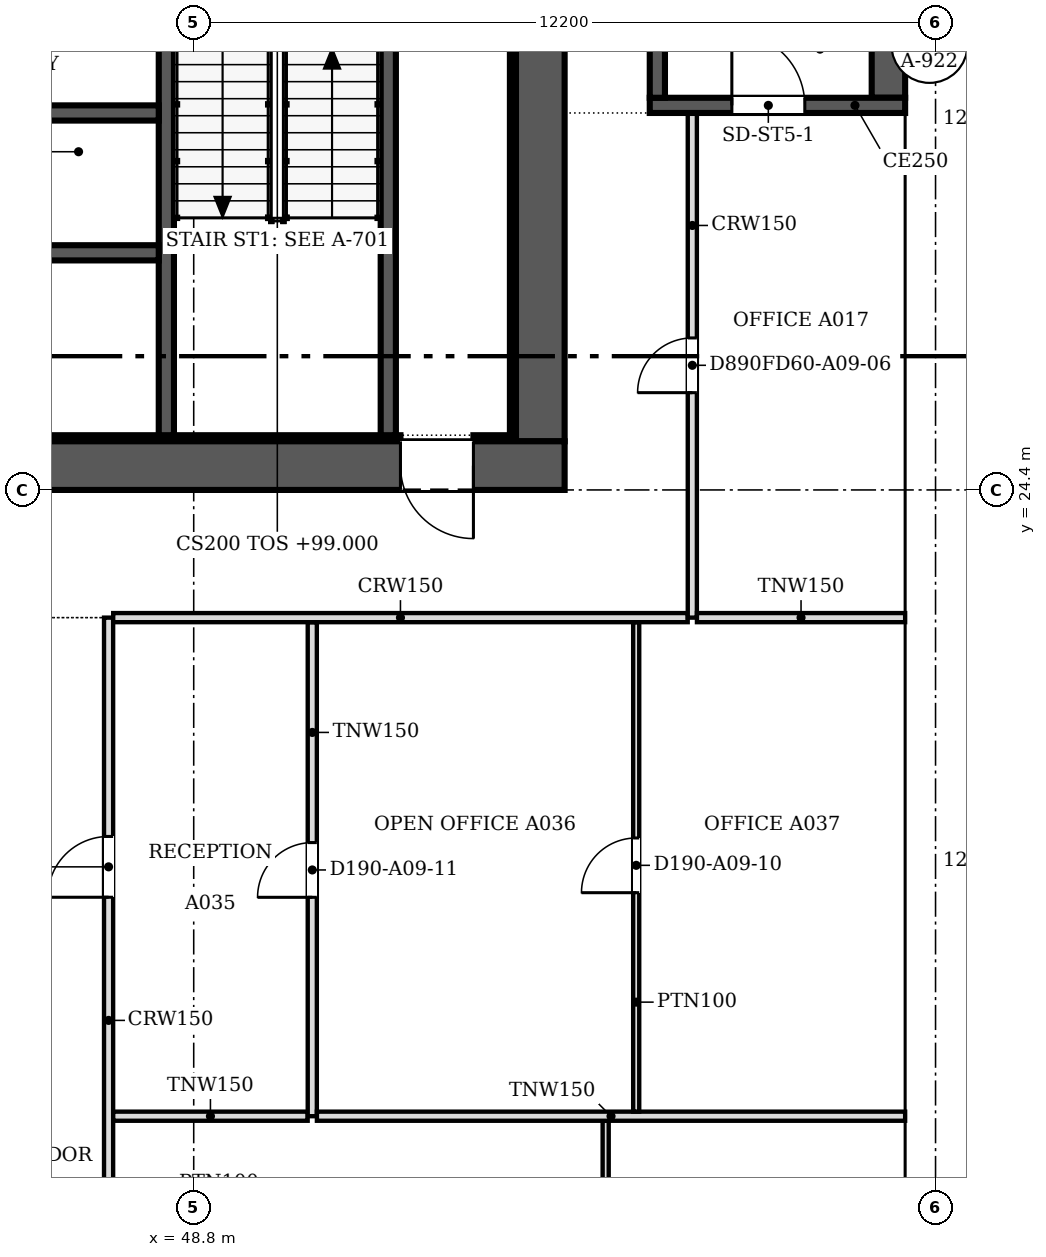
"""IFC4 building model, lengths in metres.
Left out: names, types, materials, properties, quantities, classifications, styles, units other than length and angle.
Written with IfcOpenShell. Run it as: python <this file> out.ifc"""

import sys

from ifc_helpers import new_model, si_unit, direction, frame, frame_2d, origin, place, context, subcontext, project, spatial, polyline, rectangle, outline, extrude, faceted_brep, source, transform, mapped, element, fill, save


model = new_model("IFC4")
c1 = context("Model", 3, precision=1e-05, world=origin(), true_north=direction((0.0, 1.0)))
c2 = subcontext(c1, "Body", "Model", "MODEL_VIEW")
j1 = project(units=[si_unit("LENGTHUNIT", "METRE"), si_unit("PLANEANGLEUNIT", "RADIAN")], contexts=[c1])
p1 = place(None, origin())
s1 = spatial("IfcSite", under=j1, at=p1, CompositionType="ELEMENT")
p2 = place(p1, origin())
s2 = spatial("IfcBuilding", under=s1, at=p2, CompositionType="ELEMENT")
p3 = place(p2, frame((0.0, 0.0, 99.0)))
s3 = spatial("IfcBuildingStorey", under=s2, at=p3, CompositionType="ELEMENT", Elevation=99.0)
m1 = source(origin(), c2, "Body", "SweptSolid", [
    extrude(outline(polyline([(3.05, 0.0), (6.1, 3.8), (3.05, 7.6), (0.0, 3.8), (3.05, 0.0)])), frame((0.0, 0.25, 0.0), z_axis=(0.0, -1.0, 0.0), x_axis=(1.0, 0.0, 0.0)), (0.0, 0.0, 1.0), 0.5),
])
p4 = place(p3, frame((60.75, 12.2, -3.8), z_axis=(0.0, 0.0, 1.0), x_axis=(0.0, 1.0, 0.0)))
e1 = element("IfcWall", 1, at=p4, inside=s3, PredefinedType="SOLIDWALL", context=c2, shape_type="MappedRepresentation", body=[
    mapped(m1, transform((0.0, 0.0, 0.0), scale=1.0)),
])
m2 = source(origin(), c2, "Body", "SweptSolid", [
    extrude(outline(polyline([(3.05, 0.399), (5.78, 3.8), (3.05, 7.201), (0.321, 3.8), (3.05, 0.399)])), frame((0.0, 0.26, 0.0), z_axis=(0.0, -1.0, 0.0), x_axis=(1.0, 0.0, 0.0)), (0.0, 0.0, 1.0), 0.52),
])
p5 = place(p4, origin())
e2 = element("IfcOpeningElement", 2, at=p5, cuts=e1, PredefinedType="OPENING", context=c2, shape_type="MappedRepresentation", body=[
    mapped(m2, transform((0.0, 0.0, 0.0), scale=1.0)),
])
m3 = source(origin(), c2, "Body", "Brep", [
    faceted_brep([(3.05, -0.25, 0.0), (6.1, -0.25, 3.8), (6.1, -0.25, 3.8), (3.05, -0.25, 7.6), (0.0, -0.25, 3.8), (0.0, 0.25, 3.8), (3.05, 0.25, 7.6), (6.1, 0.25, 3.8), (6.1, 0.25, 3.8), (3.05, 0.25, 0.0)], [[[0, 1, 2, 3, 4]], [[5, 6, 7, 8, 9]], [[9, 8, 1, 0]], [[7, 6, 3, 2]], [[6, 5, 4, 3]], [[5, 9, 0, 4]], [[1, 8, 7, 2]]]),
])
p6 = place(p3, frame((60.75, 18.3, -3.8), z_axis=(0.0, 0.0, 1.0), x_axis=(0.0, 1.0, 0.0)))
e3 = element("IfcWall", 3, at=p6, inside=s3, PredefinedType="SOLIDWALL", context=c2, shape_type="MappedRepresentation", body=[
    mapped(m3, transform((0.0, 0.0, 0.0), scale=1.0)),
])
p7 = place(p6, origin())
e4 = element("IfcOpeningElement", 4, at=p7, cuts=e3, PredefinedType="OPENING", context=c2, shape_type="MappedRepresentation", body=[
    mapped(m2, transform((0.0, 0.0, 0.0), scale=1.0)),
])
p8 = place(p3, frame((60.75, 24.4, -3.8), z_axis=(0.0, 0.0, 1.0), x_axis=(0.0, 1.0, 0.0)))
e5 = element("IfcWall", 5, at=p8, inside=s3, PredefinedType="SOLIDWALL", context=c2, shape_type="MappedRepresentation", body=[
    mapped(m1, transform((0.0, 0.0, 0.0), scale=1.0)),
])
p9 = place(p8, origin())
e6 = element("IfcOpeningElement", 6, at=p9, cuts=e5, PredefinedType="OPENING", context=c2, shape_type="MappedRepresentation", body=[
    mapped(m2, transform((0.0, 0.0, 0.0), scale=1.0)),
])
p10 = place(p3, frame((60.75, 30.5, -3.8), z_axis=(0.0, 0.0, 1.0), x_axis=(0.0, 1.0, 0.0)))
e7 = element("IfcWall", 7, at=p10, inside=s3, PredefinedType="SOLIDWALL", context=c2, shape_type="MappedRepresentation", body=[
    mapped(m1, transform((0.0, 0.0, 0.0), scale=1.0)),
])
p11 = place(p10, origin())
e8 = element("IfcOpeningElement", 8, at=p11, cuts=e7, PredefinedType="OPENING", context=c2, shape_type="MappedRepresentation", body=[
    mapped(m2, transform((0.0, 0.0, 0.0), scale=1.0)),
])
p12 = place(p2, frame((0.0, 0.0, 102.8)))
s4 = spatial("IfcBuildingStorey", under=s2, at=p12, CompositionType="ELEMENT", Elevation=102.8)
p13 = place(p12, frame((60.75, 9.15, -3.8), z_axis=(0.0, 0.0, 1.0), x_axis=(0.0, 1.0, 0.0)))
e9 = element("IfcWall", 9, at=p13, inside=s4, PredefinedType="SOLIDWALL", context=c2, shape_type="MappedRepresentation", body=[
    mapped(m1, transform((0.0, 0.0, 0.0), scale=1.0)),
])
p14 = place(p13, origin())
e10 = element("IfcOpeningElement", 10, at=p14, cuts=e9, PredefinedType="OPENING", context=c2, shape_type="MappedRepresentation", body=[
    mapped(m2, transform((0.0, 0.0, 0.0), scale=1.0)),
])
p15 = place(p12, frame((60.75, 15.25, -3.8), z_axis=(0.0, 0.0, 1.0), x_axis=(0.0, 1.0, 0.0)))
e11 = element("IfcWall", 11, at=p15, inside=s4, PredefinedType="SOLIDWALL", context=c2, shape_type="MappedRepresentation", body=[
    mapped(m1, transform((0.0, 0.0, 0.0), scale=1.0)),
])
p16 = place(p15, origin())
e12 = element("IfcOpeningElement", 12, at=p16, cuts=e11, PredefinedType="OPENING", context=c2, shape_type="MappedRepresentation", body=[
    mapped(m2, transform((0.0, 0.0, 0.0), scale=1.0)),
])
p17 = place(p12, frame((60.75, 21.35, -3.8), z_axis=(0.0, 0.0, 1.0), x_axis=(0.0, 1.0, 0.0)))
e13 = element("IfcWall", 13, at=p17, inside=s4, PredefinedType="SOLIDWALL", context=c2, shape_type="MappedRepresentation", body=[
    mapped(m3, transform((0.0, 0.0, 0.0), scale=1.0)),
])
p18 = place(p17, origin())
e14 = element("IfcOpeningElement", 14, at=p18, cuts=e13, PredefinedType="OPENING", context=c2, shape_type="MappedRepresentation", body=[
    mapped(m2, transform((0.0, 0.0, 0.0), scale=1.0)),
])
p19 = place(p12, frame((60.75, 27.45, -3.8), z_axis=(0.0, 0.0, 1.0), x_axis=(0.0, 1.0, 0.0)))
e15 = element("IfcWall", 15, at=p19, inside=s4, PredefinedType="SOLIDWALL", context=c2, shape_type="MappedRepresentation", body=[
    mapped(m1, transform((0.0, 0.0, 0.0), scale=1.0)),
])
p20 = place(p19, origin())
e16 = element("IfcOpeningElement", 16, at=p20, cuts=e15, PredefinedType="OPENING", context=c2, shape_type="MappedRepresentation", body=[
    mapped(m2, transform((0.0, 0.0, 0.0), scale=1.0)),
])
p21 = place(p3, frame((54.9, 24.8, 0.0), z_axis=(0.0, 0.0, 1.0), x_axis=(-1.0, 0.0, 0.0)))
e17 = element("IfcWall", 17, at=p21, inside=s3, PredefinedType="SHEAR", context=c2, shape_type="SweptSolid", body=[
    extrude(rectangle(XDim=24.4, YDim=0.8, at=frame_2d((12.2, 0.0))), origin(), (0.0, 0.0, 1.0), 3.8),
])
m4 = source(origin(), c2, "Body", "SweptSolid", [
    extrude(rectangle(XDim=1.2, YDim=2.1, at=frame_2d((0.6, 1.05))), frame((0.0, 0.41, 0.0), z_axis=(0.0, -1.0, 0.0), x_axis=(1.0, 0.0, 0.0)), (0.0, 0.0, 1.0), 0.82),
])
p22 = place(p21, frame((1.5, 0.0, 0.0)))
e18 = element("IfcOpeningElement", 18, at=p22, cuts=e17, PredefinedType="OPENING", context=c2, shape_type="MappedRepresentation", body=[
    mapped(m4, transform((0.0, 0.0, 0.0), scale=1.0)),
])
p23 = place(p3, frame((54.5, 48.0, 0.0), z_axis=(0.0, 0.0, 1.0), x_axis=(0.0, -1.0, 0.0)))
e19 = element("IfcWall", 19, at=p23, inside=s3, PredefinedType="SHEAR", context=c2, shape_type="SweptSolid", body=[
    extrude(rectangle(XDim=22.8, YDim=0.8, at=frame_2d((11.4, 0.0))), origin(), (0.0, 0.0, 1.0), 3.8),
])
p24 = place(p23, frame((4.7, 0.0, 0.0)))
e20 = element("IfcOpeningElement", 20, at=p24, cuts=e19, PredefinedType="OPENING", context=c2, shape_type="MappedRepresentation", body=[
    mapped(m4, transform((0.0, 0.0, 0.0), scale=1.0)),
])
p25 = place(p3, frame((31.3, 25.25, 0.0), z_axis=(0.0, 0.0, 1.0), x_axis=(1.0, 0.0, 0.0)))
e21 = element("IfcWall", 21, at=p25, inside=s3, PredefinedType="SOLIDWALL", context=c2, shape_type="SweptSolid", body=[
    extrude(rectangle(XDim=20.9, YDim=0.1, at=frame_2d((10.45, 0.0))), origin(), (0.0, 0.0, 1.0), 3.8),
])
p26 = place(p3, frame((53.4, 25.25, 0.0), z_axis=(0.0, 0.0, 1.0), x_axis=(1.0, 0.0, 0.0)))
e22 = element("IfcWall", 22, at=p26, inside=s3, PredefinedType="SOLIDWALL", context=c2, shape_type="SweptSolid", body=[
    extrude(rectangle(XDim=0.7, YDim=0.1, at=frame_2d((0.35, 0.0))), origin(), (0.0, 0.0, 1.0), 3.8),
])
p27 = place(p3, frame((54.05, 25.3, 0.0), z_axis=(0.0, 0.0, 1.0), x_axis=(0.0, 1.0, 0.0)))
e23 = element("IfcWall", 23, at=p27, inside=s3, PredefinedType="SOLIDWALL", context=c2, shape_type="SweptSolid", body=[
    extrude(rectangle(XDim=11.02, YDim=0.1, at=frame_2d((5.51, 0.0))), origin(), (0.0, 0.0, 1.0), 3.8),
])
p28 = place(p3, frame((48.35, 36.35, 0.0), z_axis=(0.0, 0.0, 1.0), x_axis=(0.0, -1.0, 0.0)))
e24 = element("IfcWall", 24, at=p28, inside=s3, PredefinedType="SOLIDWALL", context=c2, shape_type="SweptSolid", body=[
    extrude(rectangle(XDim=11.05, YDim=0.25, at=frame_2d((5.525, 0.0))), origin(), (0.0, 0.0, 1.0), 3.8),
])
m5 = source(origin(), c2, "Body", "SweptSolid", [
    extrude(rectangle(XDim=1.2, YDim=2.1, at=frame_2d((0.6, 1.05))), frame((0.0, 0.135, 0.0), z_axis=(0.0, -1.0, 0.0), x_axis=(1.0, 0.0, 0.0)), (0.0, 0.0, 1.0), 0.27),
])
p29 = place(p28, frame((3.225, 0.0, 0.0)))
e25 = element("IfcOpeningElement", 25, at=p29, cuts=e24, PredefinedType="OPENING", context=c2, shape_type="MappedRepresentation", body=[
    mapped(m5, transform((0.0, 0.0, 0.0), scale=1.0)),
])
p30 = place(p3, frame((42.95, 28.3, 0.0), z_axis=(0.0, 0.0, 1.0), x_axis=(1.0, 0.0, 0.0)))
e26 = element("IfcWall", 26, at=p30, inside=s3, PredefinedType="SOLIDWALL", context=c2, shape_type="SweptSolid", body=[
    extrude(rectangle(XDim=5.275, YDim=0.25, at=frame_2d((2.638, 0.0))), origin(), (0.0, 0.0, 1.0), 3.8),
])
p31 = place(p3, frame((52.0, 25.3, 0.0), z_axis=(0.0, 0.0, 1.0), x_axis=(0.0, 1.0, 0.0)))
e27 = element("IfcWall", 27, at=p31, inside=s3, PredefinedType="SOLIDWALL", context=c2, shape_type="SweptSolid", body=[
    extrude(rectangle(XDim=7.975, YDim=0.25, at=frame_2d((3.987, 0.0))), origin(), (0.0, 0.0, 1.0), 3.8),
])
p32 = place(p31, frame((6.625, 0.0, 0.0)))
e28 = element("IfcOpeningElement", 28, at=p32, cuts=e27, PredefinedType="OPENING", context=c2, shape_type="MappedRepresentation", body=[
    mapped(m5, transform((0.0, 0.0, 0.0), scale=1.0)),
])
p33 = place(p3, frame((42.95, 30.6, 0.0), z_axis=(0.0, 0.0, 1.0), x_axis=(1.0, 0.0, 0.0)))
e29 = element("IfcWall", 29, at=p33, inside=s3, PredefinedType="SOLIDWALL", context=c2, shape_type="SweptSolid", body=[
    extrude(rectangle(XDim=5.275, YDim=0.25, at=frame_2d((2.638, 0.0))), origin(), (0.0, 0.0, 1.0), 3.8),
])
p34 = place(p3, frame((60.5, 30.725, 0.0), z_axis=(0.0, 0.0, 1.0), x_axis=(-1.0, 0.0, 0.0)))
e30 = element("IfcWall", 30, at=p34, inside=s3, PredefinedType="SOLIDWALL", context=c2, shape_type="SweptSolid", body=[
    extrude(rectangle(XDim=4.2, YDim=0.25, at=frame_2d((2.1, 0.0))), origin(), (0.0, 0.0, 1.0), 3.8),
])
p35 = place(p34, frame((1.65, 0.0, 0.0)))
e31 = element("IfcOpeningElement", 31, at=p35, cuts=e30, PredefinedType="OPENING", context=c2, shape_type="MappedRepresentation", body=[
    mapped(m5, transform((0.0, 0.0, 0.0), scale=1.0)),
])
p36 = place(p3, frame((56.425, 30.85, 0.0), z_axis=(0.0, 0.0, 1.0), x_axis=(0.0, 1.0, 0.0)))
e32 = element("IfcWall", 32, at=p36, inside=s3, PredefinedType="SOLIDWALL", context=c2, shape_type="SweptSolid", body=[
    extrude(rectangle(XDim=8.0, YDim=0.25, at=frame_2d((4.0, 0.0))), origin(), (0.0, 0.0, 1.0), 3.8),
])
p37 = place(p3, frame((60.225, 38.85, 0.0), z_axis=(0.0, 0.0, 1.0), x_axis=(0.0, -1.0, 0.0)))
e33 = element("IfcWall", 33, at=p37, inside=s3, PredefinedType="SOLIDWALL", context=c2, shape_type="SweptSolid", body=[
    extrude(rectangle(XDim=8.0, YDim=0.55, at=frame_2d((4.0, 0.0))), origin(), (0.0, 0.0, 1.0), 3.8),
])
p38 = place(p3, frame((47.4, 22.3, 0.0), z_axis=(0.0, 0.0, 1.0), x_axis=(0.0, -1.0, 0.0)))
e34 = element("IfcWall", 34, at=p38, inside=s3, PredefinedType="PARTITIONING", context=c2, shape_type="SweptSolid", body=[
    extrude(rectangle(XDim=18.1, YDim=0.15, at=frame_2d((9.05, 0.0))), origin(), (0.0, 0.0, 1.0), 3.067),
])
m6 = source(origin(), c2, "Body", "SweptSolid", [
    extrude(rectangle(XDim=1.0, YDim=2.1, at=frame_2d((0.5, 1.05))), frame((0.0, 0.085, 0.0), z_axis=(0.0, -1.0, 0.0), x_axis=(1.0, 0.0, 0.0)), (0.0, 0.0, 1.0), 0.17),
])
p39 = place(p38, frame((3.599, 0.0, 0.0)))
e35 = element("IfcOpeningElement", 35, at=p39, cuts=e34, PredefinedType="OPENING", context=c2, shape_type="MappedRepresentation", body=[
    mapped(m6, transform((0.0, 0.0, 0.0), scale=1.0)),
])
m7 = source(origin(), c2, "Body", "SweptSolid", [
    extrude(rectangle(XDim=0.9, YDim=2.1, at=frame_2d((0.45, 1.05))), frame((0.0, 0.085, 0.0), z_axis=(0.0, -1.0, 0.0), x_axis=(1.0, 0.0, 0.0)), (0.0, 0.0, 1.0), 0.17),
])
p40 = place(p38, frame((12.7, 0.0, 0.0)))
e36 = element("IfcOpeningElement", 36, at=p40, cuts=e34, PredefinedType="OPENING", context=c2, shape_type="MappedRepresentation", body=[
    mapped(m7, transform((0.0, 0.0, 0.0), scale=1.0)),
])
p41 = place(p3, frame((55.575, 14.024, 0.0), z_axis=(0.0, 0.0, 1.0), x_axis=(0.0, -1.0, 0.0)))
e37 = element("IfcWall", 37, at=p41, inside=s3, PredefinedType="PARTITIONING", context=c2, shape_type="SweptSolid", body=[
    extrude(rectangle(XDim=5.924, YDim=0.1, at=frame_2d((2.962, 0.0))), origin(), (0.0, 0.0, 1.0), 3.067),
])
m8 = source(origin(), c2, "Body", "SweptSolid", [
    extrude(rectangle(XDim=0.9, YDim=2.1, at=frame_2d((0.45, 1.05))), frame((0.0, 0.06, 0.0), z_axis=(0.0, -1.0, 0.0), x_axis=(1.0, 0.0, 0.0)), (0.0, 0.0, 1.0), 0.12),
])
p42 = place(p41, frame((2.524, 0.0, 0.0)))
e38 = element("IfcOpeningElement", 38, at=p42, cuts=e37, PredefinedType="OPENING", context=c2, shape_type="MappedRepresentation", body=[
    mapped(m8, transform((0.0, 0.0, 0.0), scale=1.0)),
])
p43 = place(p3, frame((47.476, 14.1, 0.0), z_axis=(0.0, 0.0, 1.0), x_axis=(1.0, 0.0, 0.0)))
e39 = element("IfcWall", 39, at=p43, inside=s3, PredefinedType="PARTITIONING", context=c2, shape_type="SweptSolid", body=[
    extrude(rectangle(XDim=3.198, YDim=0.15, at=frame_2d((1.599, 0.0))), origin(), (0.0, 0.0, 1.0), 3.067),
])
p44 = place(p3, frame((50.75, 22.224, 0.0), z_axis=(0.0, 0.0, 1.0), x_axis=(0.0, -1.0, 0.0)))
e40 = element("IfcWall", 40, at=p44, inside=s3, PredefinedType="PARTITIONING", context=c2, shape_type="SweptSolid", body=[
    extrude(rectangle(XDim=8.124, YDim=0.15, at=frame_2d((4.062, 0.0))), origin(), (0.0, 0.0, 1.0), 3.067),
])
p45 = place(p44, frame((3.624, 0.0, 0.0)))
e41 = element("IfcOpeningElement", 41, at=p45, cuts=e40, PredefinedType="OPENING", context=c2, shape_type="MappedRepresentation", body=[
    mapped(m7, transform((0.0, 0.0, 0.0), scale=1.0)),
])
p46 = place(p3, frame((50.826, 14.1, 0.0), z_axis=(0.0, 0.0, 1.0), x_axis=(1.0, 0.0, 0.0)))
e42 = element("IfcWall", 42, at=p46, inside=s3, PredefinedType="PARTITIONING", context=c2, shape_type="SweptSolid", body=[
    extrude(rectangle(XDim=9.674, YDim=0.15, at=frame_2d((4.837, 0.0))), origin(), (0.0, 0.0, 1.0), 3.067),
])
p47 = place(p3, frame((56.077, 22.224, 0.0), z_axis=(0.0, 0.0, 1.0), x_axis=(0.0, -1.0, 0.0)))
e43 = element("IfcWall", 43, at=p47, inside=s3, PredefinedType="PARTITIONING", context=c2, shape_type="SweptSolid", body=[
    extrude(rectangle(XDim=8.048, YDim=0.1, at=frame_2d((4.024, 0.0))), origin(), (0.0, 0.0, 1.0), 3.067),
])
p48 = place(p47, frame((3.548, 0.0, 0.0)))
e44 = element("IfcOpeningElement", 44, at=p48, cuts=e43, PredefinedType="OPENING", context=c2, shape_type="MappedRepresentation", body=[
    mapped(m8, transform((0.0, 0.0, 0.0), scale=1.0)),
])
p49 = place(p3, frame((47.476, 22.3, 0.0), z_axis=(0.0, 0.0, 1.0), x_axis=(1.0, 0.0, 0.0)))
e45 = element("IfcWall", 45, at=p49, inside=s3, PredefinedType="PARTITIONING", context=c2, shape_type="SweptSolid", body=[
    extrude(rectangle(XDim=9.448, YDim=0.15, at=frame_2d((4.724, 0.0))), origin(), (0.0, 0.0, 1.0), 3.067),
])
p50 = place(p3, frame((57.0, 30.6, 0.0), z_axis=(0.0, 0.0, 1.0), x_axis=(0.0, -1.0, 0.0)))
e46 = element("IfcWall", 46, at=p50, inside=s3, PredefinedType="PARTITIONING", context=c2, shape_type="SweptSolid", body=[
    extrude(rectangle(XDim=8.3, YDim=0.15, at=frame_2d((4.15, 0.0))), origin(), (0.0, 0.0, 1.0), 3.067),
])
p51 = place(p50, frame((3.7, 0.0, 0.0)))
e47 = element("IfcOpeningElement", 47, at=p51, cuts=e46, PredefinedType="OPENING", context=c2, shape_type="MappedRepresentation", body=[
    mapped(m7, transform((0.0, 0.0, 0.0), scale=1.0)),
])
p52 = place(p3, frame((57.076, 22.3, 0.0), z_axis=(0.0, 0.0, 1.0), x_axis=(1.0, 0.0, 0.0)))
e48 = element("IfcWall", 48, at=p52, inside=s3, PredefinedType="PARTITIONING", context=c2, shape_type="SweptSolid", body=[
    extrude(rectangle(XDim=3.424, YDim=0.15, at=frame_2d((1.712, 0.0))), origin(), (0.0, 0.0, 1.0), 3.067),
])
m9 = source(origin(), c2, "Body", "SweptSolid", [
    extrude(rectangle(XDim=1.2, YDim=2.1, at=frame_2d((0.6, 1.05))), frame((0.0, 0.025, 0.0), z_axis=(0.0, -1.0, 0.0), x_axis=(1.0, 0.0, 0.0)), (0.0, 0.0, 1.0), 0.05),
])
p53 = place(p22, origin())
e49 = element("IfcDoor", 49, at=p53, inside=s3, OperationType="SINGLE_SWING_LEFT", PredefinedType="DOOR", context=c2, shape_type="MappedRepresentation", body=[
    mapped(m9, transform((0.0, 0.0, 0.0), scale=1.0)),
])
fill(e18, e49)
p54 = place(p35, origin())
e50 = element("IfcDoor", 50, at=p54, inside=s3, OperationType="SINGLE_SWING_RIGHT", PredefinedType="DOOR", context=c2, shape_type="MappedRepresentation", body=[
    mapped(m9, transform((0.0, 0.0, 0.0), scale=1.0)),
])
fill(e31, e50)
m10 = source(origin(), c2, "Body", "SweptSolid", [
    extrude(rectangle(XDim=0.9, YDim=2.1, at=frame_2d((0.45, 1.05))), frame((0.0, 0.025, 0.0), z_axis=(0.0, -1.0, 0.0), x_axis=(1.0, 0.0, 0.0)), (0.0, 0.0, 1.0), 0.05),
])
p55 = place(p48, origin())
e51 = element("IfcDoor", 51, at=p55, inside=s3, OperationType="SINGLE_SWING_RIGHT", PredefinedType="DOOR", context=c2, shape_type="MappedRepresentation", body=[
    mapped(m10, transform((0.0, 0.0, 0.0), scale=1.0)),
])
fill(e44, e51)
p56 = place(p45, origin())
e52 = element("IfcDoor", 52, at=p56, inside=s3, OperationType="SINGLE_SWING_RIGHT", PredefinedType="DOOR", context=c2, shape_type="MappedRepresentation", body=[
    mapped(m10, transform((0.0, 0.0, 0.0), scale=1.0)),
])
fill(e41, e52)
m11 = source(origin(), c2, "Body", "SweptSolid", [
    extrude(rectangle(XDim=1.0, YDim=2.1, at=frame_2d((0.5, 1.05))), frame((0.0, 0.025, 0.0), z_axis=(0.0, -1.0, 0.0), x_axis=(1.0, 0.0, 0.0)), (0.0, 0.0, 1.0), 0.05),
])
p57 = place(p39, origin())
e53 = element("IfcDoor", 53, at=p57, inside=s3, OperationType="SINGLE_SWING_RIGHT", PredefinedType="DOOR", context=c2, shape_type="MappedRepresentation", body=[
    mapped(m11, transform((0.0, 0.0, 0.0), scale=1.0)),
])
fill(e35, e53)
p58 = place(p51, origin())
e54 = element("IfcDoor", 54, at=p58, inside=s3, OperationType="SINGLE_SWING_RIGHT", PredefinedType="DOOR", context=c2, shape_type="MappedRepresentation", body=[
    mapped(m10, transform((0.0, 0.0, 0.0), scale=1.0)),
])
fill(e47, e54)
save(model, sys.argv[1])
